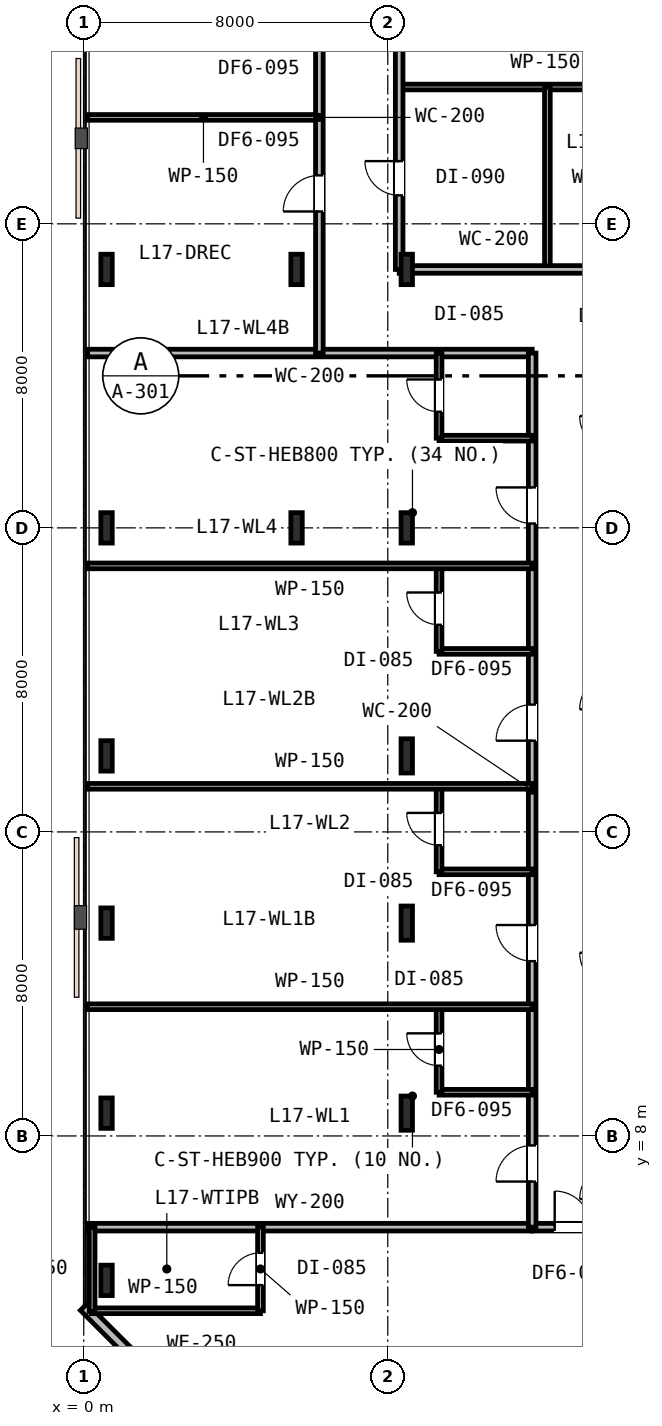
"""IFC4 building model, lengths in metres.
Left out: names, types, materials, properties, quantities, classifications, styles, units other than length and angle.
Written with IfcOpenShell. Run it as: python <this file> out.ifc"""

import sys

from ifc_helpers import new_model, si_unit, direction, frame, frame_2d, origin, origin_2d, place, context, subcontext, project, spatial, rectangle, i_section, extrude, element, fill, save


model = new_model("IFC4")
c1 = context("Model", 3, precision=1e-05, world=origin(), true_north=direction((0.0, 1.0)))
c2 = subcontext(c1, "Body", "Model", "MODEL_VIEW")
j1 = project(units=[si_unit("LENGTHUNIT", "METRE"), si_unit("PLANEANGLEUNIT", "RADIAN")], contexts=[c1])
p1 = place(None, origin())
s1 = spatial("IfcSite", under=j1, at=p1, CompositionType="ELEMENT")
p2 = place(p1, origin())
s2 = spatial("IfcBuilding", under=s1, at=p2, CompositionType="ELEMENT")
p3 = place(p2, frame((0.0, 0.0, 69.0)))
s3 = spatial("IfcBuildingStorey", under=s2, at=p3, CompositionType="ELEMENT", Elevation=69.0)
for number, where, z_axis, x_axis in (
    (1, (8.5, 24.0, 0.0), (0.0, 0.0, 1.0), (1.0, 0.0, 0.0)),
    (2, (5.6, 24.0, 0.0), (0.0, 0.0, 1.0), (1.0, 0.0, 0.0)),
    (3, (5.6, 30.8, 0.0), (0.0, 0.0, 1.0), (1.0, 0.0, 0.0)),
    (4, (8.5, 30.8, 0.0), (0.0, 0.0, 1.0), (1.0, 0.0, 0.0)),
    (5, (0.6, 24.0, 0.0), (0.0, 0.0, 1.0), (1.0, 0.0, 0.0)),
    (6, (0.6, 30.8, 0.0), (0.0, 0.0, 1.0), (1.0, 0.0, 0.0)),
    (7, (0.6, 8.6, 0.0), (0.0, 0.0, 1.0), (1.0, 0.0, 0.0)),
    (8, (0.6, 13.6, 0.0), (0.0, 0.0, 1.0), (1.0, 0.0, 0.0)),
    (9, (0.6, 18.0, 0.0), (0.0, 0.0, 1.0), (1.0, 0.0, 0.0)),
    (10, (0.6, 4.2, 0.0), (0.0, 0.0, 1.0), (1.0, 0.0, 0.0)),
):
    element("IfcColumn", number, at=place(p3, frame(where, z_axis=z_axis, x_axis=x_axis)), inside=s3, PredefinedType="COLUMN", context=c2, shape_type="SweptSolid", body=[
        extrude(i_section(OverallWidth=0.3, OverallDepth=0.8, WebThickness=0.018, FlangeThickness=0.033, FilletRadius=0.03, at=origin_2d()), origin(), (0.0, 0.0, 1.0), 3.6),
    ])
for number, where, z_axis, x_axis in (
    (11, (8.5, 8.6, 0.0), (0.0, 0.0, 1.0), (1.0, 0.0, 0.0)),
    (12, (8.5, 13.6, 0.0), (0.0, 0.0, 1.0), (1.0, 0.0, 0.0)),
    (13, (8.5, 18.0, 0.0), (0.0, 0.0, 1.0), (1.0, 0.0, 0.0)),
):
    element("IfcColumn", number, at=place(p3, frame(where, z_axis=z_axis, x_axis=x_axis)), inside=s3, PredefinedType="COLUMN", context=c2, shape_type="SweptSolid", body=[
        extrude(i_section(OverallWidth=0.3, OverallDepth=0.9, WebThickness=0.018, FlangeThickness=0.035, FilletRadius=0.03, at=origin_2d()), origin(), (0.0, 0.0, 1.0), 3.6),
    ])
p4 = place(p3, frame((0.0, 3.5, 0.0), z_axis=(0.0, 0.0, 1.0), x_axis=(0.707106781187, -0.707106781187, 0.0)))
e14 = element("IfcWall", 14, at=p4, inside=s3, PredefinedType="STANDARD", context=c2, shape_type="SweptSolid", body=[
    extrude(rectangle(XDim=4.95, YDim=0.25, at=frame_2d((2.475, 0.0))), origin(), (0.0, 0.0, 1.0), 3.33),
])
p5 = place(p4, frame((1.985, 0.0, 0.85)))
e15 = element("IfcOpeningElement", 15, at=p5, cuts=e14, PredefinedType="OPENING", context=c2, shape_type="SweptSolid", body=[
    extrude(rectangle(XDim=1.2, YDim=1.6, at=frame_2d((0.6, 0.8))), frame((0.0, 0.135, 0.0), z_axis=(0.0, -1.0, 0.0), x_axis=(1.0, 0.0, 0.0)), (0.0, 0.0, 1.0), 0.27),
])
p6 = place(p3, frame((0.1, 28.6, 0.0), z_axis=(0.0, 0.0, 1.0), x_axis=(1.0, 0.0, 0.0)))
e16 = element("IfcWall", 16, at=p6, inside=s3, PredefinedType="PARTITIONING", context=c2, shape_type="SweptSolid", body=[
    extrude(rectangle(XDim=11.7, YDim=0.2, at=frame_2d((5.85, 0.0))), origin(), (0.0, 0.0, 1.0), 2.83),
])
p7 = place(p3, frame((8.3, 35.6, 0.0), z_axis=(0.0, 0.0, 1.0), x_axis=(1.0, 0.0, 0.0)))
e17 = element("IfcWall", 17, at=p7, inside=s3, PredefinedType="PARTITIONING", context=c2, shape_type="SweptSolid", body=[
    extrude(rectangle(XDim=7.7, YDim=0.15, at=frame_2d((3.85, 0.0))), origin(), (0.0, 0.0, 1.0), 2.83),
])
p8 = place(p3, frame((12.2, 30.8, 0.0), z_axis=(0.0, 0.0, 1.0), x_axis=(0.0, 1.0, 0.0)))
e18 = element("IfcWall", 18, at=p8, inside=s3, PredefinedType="PARTITIONING", context=c2, shape_type="SweptSolid", body=[
    extrude(rectangle(XDim=4.8, YDim=0.15, at=frame_2d((2.4, 0.0))), origin(), (0.0, 0.0, 1.0), 2.83),
])
p9 = place(p3, frame((8.3, 30.8, 0.0), z_axis=(0.0, 0.0, 1.0), x_axis=(1.0, 0.0, 0.0)))
e19 = element("IfcWall", 19, at=p9, inside=s3, PredefinedType="PARTITIONING", context=c2, shape_type="SweptSolid", body=[
    extrude(rectangle(XDim=7.7, YDim=0.2, at=frame_2d((3.85, 0.0))), origin(), (0.0, 0.0, 1.0), 2.83),
])
p10 = place(p9, frame((5.325, 0.0, 0.0)))
e20 = element("IfcOpeningElement", 20, at=p10, cuts=e19, PredefinedType="OPENING", context=c2, shape_type="SweptSolid", body=[
    extrude(rectangle(XDim=0.95, YDim=2.15, at=frame_2d((0.475, 1.075))), frame((0.0, 0.11, 0.0), z_axis=(0.0, -1.0, 0.0), x_axis=(1.0, 0.0, 0.0)), (0.0, 0.0, 1.0), 0.22),
])
p11 = place(p3, frame((8.3, 30.8, 0.0), z_axis=(0.0, 0.0, 1.0), x_axis=(0.0, 1.0, 0.0)))
e21 = element("IfcWall", 21, at=p11, inside=s3, PredefinedType="PARTITIONING", context=c2, shape_type="SweptSolid", body=[
    extrude(rectangle(XDim=10.2, YDim=0.2, at=frame_2d((5.1, 0.0))), origin(), (0.0, 0.0, 1.0), 2.83),
])
p12 = place(p11, frame((1.95, 0.0, 0.0)))
e22 = element("IfcOpeningElement", 22, at=p12, cuts=e21, PredefinedType="OPENING", context=c2, shape_type="SweptSolid", body=[
    extrude(rectangle(XDim=0.9, YDim=2.15, at=frame_2d((0.45, 1.075))), frame((0.0, 0.11, 0.0), z_axis=(0.0, -1.0, 0.0), x_axis=(1.0, 0.0, 0.0)), (0.0, 0.0, 1.0), 0.22),
])
p13 = place(p11, frame((7.025, 0.0, 0.0)))
e23 = element("IfcOpeningElement", 23, at=p13, cuts=e21, PredefinedType="OPENING", context=c2, shape_type="SweptSolid", body=[
    extrude(rectangle(XDim=0.95, YDim=2.15, at=frame_2d((0.475, 1.075))), frame((0.0, 0.11, 0.0), z_axis=(0.0, -1.0, 0.0), x_axis=(1.0, 0.0, 0.0)), (0.0, 0.0, 1.0), 0.22),
])
p14 = place(p3, frame((0.1, 34.8, 0.0), z_axis=(0.0, 0.0, 1.0), x_axis=(1.0, 0.0, 0.0)))
e24 = element("IfcWall", 24, at=p14, inside=s3, PredefinedType="PARTITIONING", context=c2, shape_type="SweptSolid", body=[
    extrude(rectangle(XDim=6.1, YDim=0.15, at=frame_2d((3.05, 0.0))), origin(), (0.0, 0.0, 1.0), 2.83),
])
p15 = place(p3, frame((6.2, 28.6, 0.0), z_axis=(0.0, 0.0, 1.0), x_axis=(0.0, 1.0, 0.0)))
e25 = element("IfcWall", 25, at=p15, inside=s3, PredefinedType="PARTITIONING", context=c2, shape_type="SweptSolid", body=[
    extrude(rectangle(XDim=12.4, YDim=0.2, at=frame_2d((6.2, 0.0))), origin(), (0.0, 0.0, 1.0), 2.83),
])
p16 = place(p15, frame((3.725, 0.0, 0.0)))
e26 = element("IfcOpeningElement", 26, at=p16, cuts=e25, PredefinedType="OPENING", context=c2, shape_type="SweptSolid", body=[
    extrude(rectangle(XDim=0.95, YDim=2.15, at=frame_2d((0.475, 1.075))), frame((0.0, 0.11, 0.0), z_axis=(0.0, -1.0, 0.0), x_axis=(1.0, 0.0, 0.0)), (0.0, 0.0, 1.0), 0.22),
])
p17 = place(p15, frame((8.381, 0.0, 0.0)))
e27 = element("IfcOpeningElement", 27, at=p17, cuts=e25, PredefinedType="OPENING", context=c2, shape_type="SweptSolid", body=[
    extrude(rectangle(XDim=0.95, YDim=2.15, at=frame_2d((0.475, 1.075))), frame((0.0, 0.11, 0.0), z_axis=(0.0, -1.0, 0.0), x_axis=(1.0, 0.0, 0.0)), (0.0, 0.0, 1.0), 0.22),
])
p18 = place(p3, frame((0.1, 5.6, 0.0), z_axis=(0.0, 0.0, 1.0), x_axis=(1.0, 0.0, 0.0)))
e28 = element("IfcWall", 28, at=p18, inside=s3, PredefinedType="PARTITIONING", context=c2, shape_type="SweptSolid", body=[
    extrude(rectangle(XDim=11.7, YDim=0.2, at=frame_2d((5.85, 0.0))), origin(), (0.0, 0.0, 1.0), 2.92),
])
p19 = place(p3, frame((11.8, 5.6, 0.0), z_axis=(0.0, 0.0, 1.0), x_axis=(1.0, 0.0, 0.0)))
e29 = element("IfcWall", 29, at=p19, inside=s3, PredefinedType="PARTITIONING", context=c2, shape_type="SweptSolid", body=[
    extrude(rectangle(XDim=2.2, YDim=0.2, at=frame_2d((1.1, 0.0))), origin(), (0.0, 0.0, 1.0), 3.33),
])
p20 = place(p19, frame((0.593, 0.0, 0.0)))
e30 = element("IfcOpeningElement", 30, at=p20, cuts=e29, PredefinedType="OPENING", context=c2, shape_type="SweptSolid", body=[
    extrude(rectangle(XDim=0.95, YDim=2.15, at=frame_2d((0.475, 1.075))), frame((0.0, 0.11, 0.0), z_axis=(0.0, -1.0, 0.0), x_axis=(1.0, 0.0, 0.0)), (0.0, 0.0, 1.0), 0.22),
])
p21 = place(p3, frame((0.2, 3.4, 0.0), z_axis=(0.0, 0.0, 1.0), x_axis=(1.0, 0.0, 0.0)))
e31 = element("IfcWall", 31, at=p21, inside=s3, PredefinedType="PARTITIONING", context=c2, shape_type="SweptSolid", body=[
    extrude(rectangle(XDim=4.45, YDim=0.15, at=frame_2d((2.225, 0.0))), origin(), (0.0, 0.0, 1.0), 3.33),
])
p22 = place(p3, frame((4.65, 3.4, 0.0), z_axis=(0.0, 0.0, 1.0), x_axis=(0.0, 1.0, 0.0)))
e32 = element("IfcWall", 32, at=p22, inside=s3, PredefinedType="PARTITIONING", context=c2, shape_type="SweptSolid", body=[
    extrude(rectangle(XDim=2.2, YDim=0.15, at=frame_2d((1.1, 0.0))), origin(), (0.0, 0.0, 1.0), 3.33),
])
p23 = place(p22, frame((0.675, 0.0, 0.0)))
e33 = element("IfcOpeningElement", 33, at=p23, cuts=e32, PredefinedType="OPENING", context=c2, shape_type="SweptSolid", body=[
    extrude(rectangle(XDim=0.85, YDim=2.15, at=frame_2d((0.425, 1.075))), frame((0.0, 0.085, 0.0), z_axis=(0.0, -1.0, 0.0), x_axis=(1.0, 0.0, 0.0)), (0.0, 0.0, 1.0), 0.17),
])
p24 = place(p3, frame((0.22, 3.38, 0.0), z_axis=(0.0, 0.0, 1.0), x_axis=(0.0, 1.0, 0.0)))
e34 = element("IfcWall", 34, at=p24, inside=s3, PredefinedType="PARTITIONING", context=c2, shape_type="SweptSolid", body=[
    extrude(rectangle(XDim=2.22, YDim=0.15, at=frame_2d((1.11, 0.0))), origin(), (0.0, 0.0, 1.0), 2.92),
])
p25 = place(p3, frame((11.8, 5.6, 0.0), z_axis=(0.0, 0.0, 1.0), x_axis=(0.0, 1.0, 0.0)))
e35 = element("IfcWall", 35, at=p25, inside=s3, PredefinedType="PARTITIONING", context=c2, shape_type="SweptSolid", body=[
    extrude(rectangle(XDim=23.0, YDim=0.2, at=frame_2d((11.5, 0.0))), origin(), (0.0, 0.0, 1.0), 2.83),
])
p26 = place(p25, frame((1.2, 0.0, 0.0)))
e36 = element("IfcOpeningElement", 36, at=p26, cuts=e35, PredefinedType="OPENING", context=c2, shape_type="SweptSolid", body=[
    extrude(rectangle(XDim=0.95, YDim=2.15, at=frame_2d((0.475, 1.075))), frame((0.0, 0.11, 0.0), z_axis=(0.0, -1.0, 0.0), x_axis=(1.0, 0.0, 0.0)), (0.0, 0.0, 1.0), 0.22),
])
p27 = place(p25, frame((7.0, 0.0, 0.0)))
e37 = element("IfcOpeningElement", 37, at=p27, cuts=e35, PredefinedType="OPENING", context=c2, shape_type="SweptSolid", body=[
    extrude(rectangle(XDim=0.95, YDim=2.15, at=frame_2d((0.475, 1.075))), frame((0.0, 0.11, 0.0), z_axis=(0.0, -1.0, 0.0), x_axis=(1.0, 0.0, 0.0)), (0.0, 0.0, 1.0), 0.22),
])
p28 = place(p25, frame((12.8, 0.0, 0.0)))
e38 = element("IfcOpeningElement", 38, at=p28, cuts=e35, PredefinedType="OPENING", context=c2, shape_type="SweptSolid", body=[
    extrude(rectangle(XDim=0.95, YDim=2.15, at=frame_2d((0.475, 1.075))), frame((0.0, 0.11, 0.0), z_axis=(0.0, -1.0, 0.0), x_axis=(1.0, 0.0, 0.0)), (0.0, 0.0, 1.0), 0.22),
])
p29 = place(p25, frame((18.515, 0.0, 0.0)))
e39 = element("IfcOpeningElement", 39, at=p29, cuts=e35, PredefinedType="OPENING", context=c2, shape_type="SweptSolid", body=[
    extrude(rectangle(XDim=0.95, YDim=2.15, at=frame_2d((0.475, 1.075))), frame((0.0, 0.11, 0.0), z_axis=(0.0, -1.0, 0.0), x_axis=(1.0, 0.0, 0.0)), (0.0, 0.0, 1.0), 0.22),
])
p30 = place(p3, frame((9.35, 9.15, 0.0), z_axis=(0.0, 0.0, 1.0), x_axis=(1.0, 0.0, 0.0)))
e40 = element("IfcWall", 40, at=p30, inside=s3, PredefinedType="PARTITIONING", context=c2, shape_type="SweptSolid", body=[
    extrude(rectangle(XDim=2.45, YDim=0.15, at=frame_2d((1.225, 0.0))), origin(), (0.0, 0.0, 1.0), 3.02),
])
p31 = place(p3, frame((9.35, 9.15, 0.0), z_axis=(0.0, 0.0, 1.0), x_axis=(0.0, 1.0, 0.0)))
e41 = element("IfcWall", 41, at=p31, inside=s3, PredefinedType="PARTITIONING", context=c2, shape_type="SweptSolid", body=[
    extrude(rectangle(XDim=2.25, YDim=0.15, at=frame_2d((1.125, 0.0))), origin(), (0.0, 0.0, 1.0), 3.33),
])
p32 = place(p31, frame((0.7, 0.0, 0.0)))
e42 = element("IfcOpeningElement", 42, at=p32, cuts=e41, PredefinedType="OPENING", context=c2, shape_type="SweptSolid", body=[
    extrude(rectangle(XDim=0.85, YDim=2.15, at=frame_2d((0.425, 1.075))), frame((0.0, 0.085, 0.0), z_axis=(0.0, -1.0, 0.0), x_axis=(1.0, 0.0, 0.0)), (0.0, 0.0, 1.0), 0.17),
])
p33 = place(p3, frame((0.1, 11.4, 0.0), z_axis=(0.0, 0.0, 1.0), x_axis=(1.0, 0.0, 0.0)))
e43 = element("IfcWall", 43, at=p33, inside=s3, PredefinedType="PARTITIONING", context=c2, shape_type="SweptSolid", body=[
    extrude(rectangle(XDim=11.7, YDim=0.15, at=frame_2d((5.85, 0.0))), origin(), (0.0, 0.0, 1.0), 2.83),
])
p34 = place(p3, frame((9.35, 14.95, 0.0), z_axis=(0.0, 0.0, 1.0), x_axis=(1.0, 0.0, 0.0)))
e44 = element("IfcWall", 44, at=p34, inside=s3, PredefinedType="PARTITIONING", context=c2, shape_type="SweptSolid", body=[
    extrude(rectangle(XDim=2.45, YDim=0.15, at=frame_2d((1.225, 0.0))), origin(), (0.0, 0.0, 1.0), 3.02),
])
p35 = place(p3, frame((9.35, 14.95, 0.0), z_axis=(0.0, 0.0, 1.0), x_axis=(0.0, 1.0, 0.0)))
e45 = element("IfcWall", 45, at=p35, inside=s3, PredefinedType="PARTITIONING", context=c2, shape_type="SweptSolid", body=[
    extrude(rectangle(XDim=2.25, YDim=0.15, at=frame_2d((1.125, 0.0))), origin(), (0.0, 0.0, 1.0), 3.33),
])
p36 = place(p35, frame((0.7, 0.0, 0.0)))
e46 = element("IfcOpeningElement", 46, at=p36, cuts=e45, PredefinedType="OPENING", context=c2, shape_type="SweptSolid", body=[
    extrude(rectangle(XDim=0.85, YDim=2.15, at=frame_2d((0.425, 1.075))), frame((0.0, 0.085, 0.0), z_axis=(0.0, -1.0, 0.0), x_axis=(1.0, 0.0, 0.0)), (0.0, 0.0, 1.0), 0.17),
])
p37 = place(p3, frame((0.1, 17.2, 0.0), z_axis=(0.0, 0.0, 1.0), x_axis=(1.0, 0.0, 0.0)))
e47 = element("IfcWall", 47, at=p37, inside=s3, PredefinedType="PARTITIONING", context=c2, shape_type="SweptSolid", body=[
    extrude(rectangle(XDim=11.7, YDim=0.15, at=frame_2d((5.85, 0.0))), origin(), (0.0, 0.0, 1.0), 2.83),
])
p38 = place(p3, frame((9.35, 20.75, 0.0), z_axis=(0.0, 0.0, 1.0), x_axis=(1.0, 0.0, 0.0)))
e48 = element("IfcWall", 48, at=p38, inside=s3, PredefinedType="PARTITIONING", context=c2, shape_type="SweptSolid", body=[
    extrude(rectangle(XDim=2.45, YDim=0.15, at=frame_2d((1.225, 0.0))), origin(), (0.0, 0.0, 1.0), 3.33),
])
p39 = place(p3, frame((9.35, 20.75, 0.0), z_axis=(0.0, 0.0, 1.0), x_axis=(0.0, 1.0, 0.0)))
e49 = element("IfcWall", 49, at=p39, inside=s3, PredefinedType="PARTITIONING", context=c2, shape_type="SweptSolid", body=[
    extrude(rectangle(XDim=2.25, YDim=0.15, at=frame_2d((1.125, 0.0))), origin(), (0.0, 0.0, 1.0), 3.33),
])
p40 = place(p39, frame((0.7, 0.0, 0.0)))
e50 = element("IfcOpeningElement", 50, at=p40, cuts=e49, PredefinedType="OPENING", context=c2, shape_type="SweptSolid", body=[
    extrude(rectangle(XDim=0.85, YDim=2.15, at=frame_2d((0.425, 1.075))), frame((0.0, 0.085, 0.0), z_axis=(0.0, -1.0, 0.0), x_axis=(1.0, 0.0, 0.0)), (0.0, 0.0, 1.0), 0.17),
])
p41 = place(p3, frame((0.1, 23.0, 0.0), z_axis=(0.0, 0.0, 1.0), x_axis=(1.0, 0.0, 0.0)))
e51 = element("IfcWall", 51, at=p41, inside=s3, PredefinedType="PARTITIONING", context=c2, shape_type="SweptSolid", body=[
    extrude(rectangle(XDim=11.7, YDim=0.15, at=frame_2d((5.85, 0.0))), origin(), (0.0, 0.0, 1.0), 2.83),
])
p42 = place(p3, frame((9.35, 26.36, 0.0), z_axis=(0.0, 0.0, 1.0), x_axis=(1.0, 0.0, 0.0)))
e52 = element("IfcWall", 52, at=p42, inside=s3, PredefinedType="PARTITIONING", context=c2, shape_type="SweptSolid", body=[
    extrude(rectangle(XDim=2.45, YDim=0.15, at=frame_2d((1.225, 0.0))), origin(), (0.0, 0.0, 1.0), 3.33),
])
p43 = place(p3, frame((9.35, 26.36, 0.0), z_axis=(0.0, 0.0, 1.0), x_axis=(0.0, 1.0, 0.0)))
e53 = element("IfcWall", 53, at=p43, inside=s3, PredefinedType="PARTITIONING", context=c2, shape_type="SweptSolid", body=[
    extrude(rectangle(XDim=2.24, YDim=0.15, at=frame_2d((1.12, 0.0))), origin(), (0.0, 0.0, 1.0), 3.33),
])
p44 = place(p43, frame((0.695, 0.0, 0.0)))
e54 = element("IfcOpeningElement", 54, at=p44, cuts=e53, PredefinedType="OPENING", context=c2, shape_type="SweptSolid", body=[
    extrude(rectangle(XDim=0.85, YDim=2.15, at=frame_2d((0.425, 1.075))), frame((0.0, 0.085, 0.0), z_axis=(0.0, -1.0, 0.0), x_axis=(1.0, 0.0, 0.0)), (0.0, 0.0, 1.0), 0.17),
])
p45 = place(p12, origin())
e55 = element("IfcDoor", 55, at=p45, inside=s3, OperationType="SINGLE_SWING_RIGHT", PredefinedType="DOOR", context=c2, shape_type="SweptSolid", body=[
    extrude(rectangle(XDim=0.9, YDim=2.15, at=frame_2d((0.45, 1.075))), frame((0.0, 0.025, 0.0), z_axis=(0.0, -1.0, 0.0), x_axis=(1.0, 0.0, 0.0)), (0.0, 0.0, 1.0), 0.05),
])
fill(e22, e55)
p46 = place(p16, origin())
e56 = element("IfcDoor", 56, at=p46, inside=s3, OperationType="SINGLE_SWING_LEFT", PredefinedType="DOOR", context=c2, shape_type="SweptSolid", body=[
    extrude(rectangle(XDim=0.95, YDim=2.15, at=frame_2d((0.475, 1.075))), frame((0.0, 0.025, 0.0), z_axis=(0.0, -1.0, 0.0), x_axis=(1.0, 0.0, 0.0)), (0.0, 0.0, 1.0), 0.05),
])
fill(e26, e56)
p47 = place(p20, origin())
e57 = element("IfcDoor", 57, at=p47, inside=s3, OperationType="SINGLE_SWING_LEFT", PredefinedType="DOOR", context=c2, shape_type="SweptSolid", body=[
    extrude(rectangle(XDim=0.95, YDim=2.15, at=frame_2d((0.475, 1.075))), frame((0.0, 0.025, 0.0), z_axis=(0.0, -1.0, 0.0), x_axis=(1.0, 0.0, 0.0)), (0.0, 0.0, 1.0), 0.05),
])
fill(e30, e57)
p48 = place(p23, origin())
e58 = element("IfcDoor", 58, at=p48, inside=s3, OperationType="SINGLE_SWING_LEFT", PredefinedType="DOOR", context=c2, shape_type="SweptSolid", body=[
    extrude(rectangle(XDim=0.85, YDim=2.15, at=frame_2d((0.425, 1.075))), frame((0.0, 0.025, 0.0), z_axis=(0.0, -1.0, 0.0), x_axis=(1.0, 0.0, 0.0)), (0.0, 0.0, 1.0), 0.05),
])
fill(e33, e58)
p49 = place(p26, origin())
e59 = element("IfcDoor", 59, at=p49, inside=s3, OperationType="SINGLE_SWING_LEFT", PredefinedType="DOOR", context=c2, shape_type="SweptSolid", body=[
    extrude(rectangle(XDim=0.95, YDim=2.15, at=frame_2d((0.475, 1.075))), frame((0.0, 0.025, 0.0), z_axis=(0.0, -1.0, 0.0), x_axis=(1.0, 0.0, 0.0)), (0.0, 0.0, 1.0), 0.05),
])
fill(e36, e59)
p50 = place(p32, origin())
e60 = element("IfcDoor", 60, at=p50, inside=s3, OperationType="SINGLE_SWING_RIGHT", PredefinedType="DOOR", context=c2, shape_type="SweptSolid", body=[
    extrude(rectangle(XDim=0.85, YDim=2.15, at=frame_2d((0.425, 1.075))), frame((0.0, 0.025, 0.0), z_axis=(0.0, -1.0, 0.0), x_axis=(1.0, 0.0, 0.0)), (0.0, 0.0, 1.0), 0.05),
])
fill(e42, e60)
p51 = place(p27, origin())
e61 = element("IfcDoor", 61, at=p51, inside=s3, OperationType="SINGLE_SWING_RIGHT", PredefinedType="DOOR", context=c2, shape_type="SweptSolid", body=[
    extrude(rectangle(XDim=0.95, YDim=2.15, at=frame_2d((0.475, 1.075))), frame((0.0, 0.025, 0.0), z_axis=(0.0, -1.0, 0.0), x_axis=(1.0, 0.0, 0.0)), (0.0, 0.0, 1.0), 0.05),
])
fill(e37, e61)
p52 = place(p36, origin())
e62 = element("IfcDoor", 62, at=p52, inside=s3, OperationType="SINGLE_SWING_RIGHT", PredefinedType="DOOR", context=c2, shape_type="SweptSolid", body=[
    extrude(rectangle(XDim=0.85, YDim=2.15, at=frame_2d((0.425, 1.075))), frame((0.0, 0.025, 0.0), z_axis=(0.0, -1.0, 0.0), x_axis=(1.0, 0.0, 0.0)), (0.0, 0.0, 1.0), 0.05),
])
fill(e46, e62)
p53 = place(p28, origin())
e63 = element("IfcDoor", 63, at=p53, inside=s3, OperationType="SINGLE_SWING_LEFT", PredefinedType="DOOR", context=c2, shape_type="SweptSolid", body=[
    extrude(rectangle(XDim=0.95, YDim=2.15, at=frame_2d((0.475, 1.075))), frame((0.0, 0.025, 0.0), z_axis=(0.0, -1.0, 0.0), x_axis=(1.0, 0.0, 0.0)), (0.0, 0.0, 1.0), 0.05),
])
fill(e38, e63)
p54 = place(p40, origin())
e64 = element("IfcDoor", 64, at=p54, inside=s3, OperationType="SINGLE_SWING_RIGHT", PredefinedType="DOOR", context=c2, shape_type="SweptSolid", body=[
    extrude(rectangle(XDim=0.85, YDim=2.15, at=frame_2d((0.425, 1.075))), frame((0.0, 0.025, 0.0), z_axis=(0.0, -1.0, 0.0), x_axis=(1.0, 0.0, 0.0)), (0.0, 0.0, 1.0), 0.05),
])
fill(e50, e64)
p55 = place(p29, origin())
e65 = element("IfcDoor", 65, at=p55, inside=s3, OperationType="SINGLE_SWING_RIGHT", PredefinedType="DOOR", context=c2, shape_type="SweptSolid", body=[
    extrude(rectangle(XDim=0.95, YDim=2.15, at=frame_2d((0.475, 1.075))), frame((0.0, 0.025, 0.0), z_axis=(0.0, -1.0, 0.0), x_axis=(1.0, 0.0, 0.0)), (0.0, 0.0, 1.0), 0.05),
])
fill(e39, e65)
p56 = place(p44, origin())
e66 = element("IfcDoor", 66, at=p56, inside=s3, OperationType="SINGLE_SWING_RIGHT", PredefinedType="DOOR", context=c2, shape_type="SweptSolid", body=[
    extrude(rectangle(XDim=0.85, YDim=2.15, at=frame_2d((0.425, 1.075))), frame((0.0, 0.025, 0.0), z_axis=(0.0, -1.0, 0.0), x_axis=(1.0, 0.0, 0.0)), (0.0, 0.0, 1.0), 0.05),
])
fill(e54, e66)
save(model, sys.argv[1])
